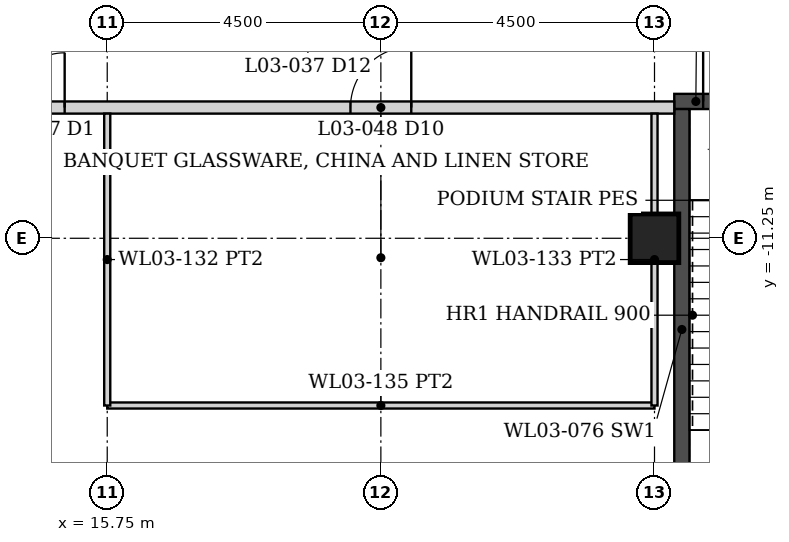
"""IFC4 building model, lengths in metres.
Left out: names, types, materials, properties, quantities, classifications, styles, units other than length and angle.
Written with IfcOpenShell. Run it as: python <this file> out.ifc"""

import sys

from ifc_helpers import new_model, si_unit, direction, frame, frame_2d, origin, origin_2d, place, context, subcontext, project, spatial, rectangle, hollow_rectangle, extrude, element, fill, save


model = new_model("IFC4")
c1 = context("Model", 3, precision=1e-05, world=origin(), true_north=direction((0.0, 1.0)))
c2 = subcontext(c1, "Body", "Model", "MODEL_VIEW")
j1 = project(units=[si_unit("LENGTHUNIT", "METRE"), si_unit("PLANEANGLEUNIT", "RADIAN")], contexts=[c1])
p1 = place(None, origin())
s1 = spatial("IfcSite", under=j1, at=p1, CompositionType="ELEMENT")
p2 = place(p1, origin())
s2 = spatial("IfcBuilding", under=s1, at=p2, CompositionType="ELEMENT")
p3 = place(p2, frame((0.0, 0.0, 16.0)))
s3 = spatial("IfcBuildingStorey", under=s2, at=p3, CompositionType="ELEMENT", Elevation=16.0)
p4 = place(p3, frame((24.75, -11.25, 0.0), z_axis=(0.0, 0.0, 1.0), x_axis=(1.0, 0.0, 0.0)))
e1 = element("IfcColumn", 1, at=p4, inside=s3, PredefinedType="COLUMN", context=c2, shape_type="SweptSolid", body=[
    extrude(hollow_rectangle(XDim=0.8, YDim=0.8, WallThickness=0.08, at=origin_2d()), origin(), (0.0, 0.0, 1.0), 5.5),
])
p5 = place(p3, frame((25.075, -9.0, 0.0), z_axis=(0.0, 0.0, 1.0), x_axis=(1.0, 0.0, 0.0)))
e2 = element("IfcWall", 2, at=p5, inside=s3, PredefinedType="SHEAR", context=c2, shape_type="SweptSolid", body=[
    extrude(rectangle(XDim=3.55, YDim=0.25, at=frame_2d((1.775, 0.0))), origin(), (0.0, 0.0, 1.0), 5.5),
])
p6 = place(p5, frame((0.475, 0.0, 0.0)))
e3 = element("IfcOpeningElement", 3, at=p6, cuts=e2, PredefinedType="OPENING", context=c2, shape_type="SweptSolid", body=[
    extrude(rectangle(XDim=1.2, YDim=2.1, at=frame_2d((0.6, 1.05))), frame((0.0, 0.135, 0.0), z_axis=(0.0, -1.0, 0.0), x_axis=(1.0, 0.0, 0.0)), (0.0, 0.0, 1.0), 0.27),
])
p7 = place(p3, frame((25.2, -16.375, 0.0), z_axis=(0.0, 0.0, 1.0), x_axis=(0.0, 1.0, 0.0)))
e4 = element("IfcWall", 4, at=p7, inside=s3, PredefinedType="SHEAR", context=c2, shape_type="SweptSolid", body=[
    extrude(rectangle(XDim=7.25, YDim=0.25, at=frame_2d((3.625, 0.0))), origin(), (0.0, 0.0, 1.0), 5.5),
])
p8 = place(p3, frame((-25.075, -9.1, 0.0), z_axis=(0.0, 0.0, 1.0), x_axis=(1.0, 0.0, 0.0)))
e5 = element("IfcWall", 5, at=p8, inside=s3, PredefinedType="PARTITIONING", context=c2, shape_type="SweptSolid", body=[
    extrude(rectangle(XDim=50.15, YDim=0.2, at=frame_2d((25.075, 0.0))), origin(), (0.0, 0.0, 1.0), 4.329),
])
p9 = place(p8, frame((2.125, 0.0, 0.0)))
e6 = element("IfcOpeningElement", 6, at=p9, cuts=e5, PredefinedType="OPENING", context=c2, shape_type="SweptSolid", body=[
    extrude(rectangle(XDim=0.9, YDim=2.1, at=frame_2d((0.45, 1.05))), frame((0.0, 0.11, 0.0), z_axis=(0.0, -1.0, 0.0), x_axis=(1.0, 0.0, 0.0)), (0.0, 0.0, 1.0), 0.22),
])
p10 = place(p8, frame((10.225, 0.0, 0.0)))
e7 = element("IfcOpeningElement", 7, at=p10, cuts=e5, PredefinedType="OPENING", context=c2, shape_type="SweptSolid", body=[
    extrude(rectangle(XDim=0.9, YDim=2.1, at=frame_2d((0.45, 1.05))), frame((0.0, 0.11, 0.0), z_axis=(0.0, -1.0, 0.0), x_axis=(1.0, 0.0, 0.0)), (0.0, 0.0, 1.0), 0.22),
])
p11 = place(p8, frame((16.7, 0.0, 0.0)))
e8 = element("IfcOpeningElement", 8, at=p11, cuts=e5, PredefinedType="OPENING", context=c2, shape_type="SweptSolid", body=[
    extrude(rectangle(XDim=1.0, YDim=2.1, at=frame_2d((0.5, 1.05))), frame((0.0, 0.11, 0.0), z_axis=(0.0, -1.0, 0.0), x_axis=(1.0, 0.0, 0.0)), (0.0, 0.0, 1.0), 0.22),
])
p12 = place(p8, frame((14.525, 0.0, 0.0)))
e9 = element("IfcOpeningElement", 9, at=p12, cuts=e5, PredefinedType="OPENING", context=c2, shape_type="SweptSolid", body=[
    extrude(rectangle(XDim=0.9, YDim=2.1, at=frame_2d((0.45, 1.05))), frame((0.0, 0.11, 0.0), z_axis=(0.0, -1.0, 0.0), x_axis=(1.0, 0.0, 0.0)), (0.0, 0.0, 1.0), 0.22),
])
p13 = place(p8, frame((21.25, 0.0, 0.0)))
e10 = element("IfcOpeningElement", 10, at=p13, cuts=e5, PredefinedType="OPENING", context=c2, shape_type="SweptSolid", body=[
    extrude(rectangle(XDim=0.9, YDim=2.1, at=frame_2d((0.45, 1.05))), frame((0.0, 0.11, 0.0), z_axis=(0.0, -1.0, 0.0), x_axis=(1.0, 0.0, 0.0)), (0.0, 0.0, 1.0), 0.22),
])
p14 = place(p8, frame((33.325, 0.0, 0.0)))
e11 = element("IfcOpeningElement", 11, at=p14, cuts=e5, PredefinedType="OPENING", context=c2, shape_type="SweptSolid", body=[
    extrude(rectangle(XDim=1.5, YDim=2.1, at=frame_2d((0.75, 1.05))), frame((0.0, 0.11, 0.0), z_axis=(0.0, -1.0, 0.0), x_axis=(1.0, 0.0, 0.0)), (0.0, 0.0, 1.0), 0.22),
])
p15 = place(p8, frame((36.95, 0.0, 0.0)))
e12 = element("IfcOpeningElement", 12, at=p15, cuts=e5, PredefinedType="OPENING", context=c2, shape_type="SweptSolid", body=[
    extrude(rectangle(XDim=1.0, YDim=2.1, at=frame_2d((0.5, 1.05))), frame((0.0, 0.11, 0.0), z_axis=(0.0, -1.0, 0.0), x_axis=(1.0, 0.0, 0.0)), (0.0, 0.0, 1.0), 0.22),
])
p16 = place(p8, frame((44.825, 0.0, 0.0)))
e13 = element("IfcOpeningElement", 13, at=p16, cuts=e5, PredefinedType="OPENING", context=c2, shape_type="SweptSolid", body=[
    extrude(rectangle(XDim=1.0, YDim=2.1, at=frame_2d((0.5, 1.05))), frame((0.0, 0.11, 0.0), z_axis=(0.0, -1.0, 0.0), x_axis=(1.0, 0.0, 0.0)), (0.0, 0.0, 1.0), 0.22),
])
p17 = place(p8, frame((39.225, 0.0, 0.0)))
e14 = element("IfcOpeningElement", 14, at=p17, cuts=e5, PredefinedType="OPENING", context=c2, shape_type="SweptSolid", body=[
    extrude(rectangle(XDim=0.9, YDim=2.1, at=frame_2d((0.45, 1.05))), frame((0.0, 0.11, 0.0), z_axis=(0.0, -1.0, 0.0), x_axis=(1.0, 0.0, 0.0)), (0.0, 0.0, 1.0), 0.22),
])
p18 = place(p3, frame((15.75, -14.0, 0.0), z_axis=(0.0, 0.0, 1.0), x_axis=(1.0, 0.0, 0.0)))
e15 = element("IfcWall", 15, at=p18, inside=s3, PredefinedType="PARTITIONING", context=c2, shape_type="SweptSolid", body=[
    extrude(rectangle(XDim=9.0, YDim=0.1, at=frame_2d((4.5, 0.0))), origin(), (0.0, 0.0, 1.0), 4.329),
])
for number, where, z_axis, x_axis in (
    (16, (15.75, -14.0, 0.0), (0.0, 0.0, 1.0), (0.0, 1.0, 0.0)),
    (17, (24.75, -14.0, 0.0), (0.0, 0.0, 1.0), (0.0, 1.0, 0.0)),
):
    element("IfcWall", number, at=place(p3, frame(where, z_axis=z_axis, x_axis=x_axis)), inside=s3, PredefinedType="PARTITIONING", context=c2, shape_type="SweptSolid", body=[
        extrude(rectangle(XDim=4.8, YDim=0.1, at=frame_2d((2.4, 0.0))), origin(), (0.0, 0.0, 1.0), 4.329),
    ])
p19 = place(p16, origin())
e18 = element("IfcDoor", 18, at=p19, inside=s3, OperationType="SINGLE_SWING_RIGHT", PredefinedType="DOOR", context=c2, shape_type="SweptSolid", body=[
    extrude(rectangle(XDim=1.0, YDim=2.1, at=frame_2d((0.5, 1.05))), frame((0.0, 0.025, 0.0), z_axis=(0.0, -1.0, 0.0), x_axis=(1.0, 0.0, 0.0)), (0.0, 0.0, 1.0), 0.05),
])
fill(e13, e18)
p20 = place(p17, origin())
e19 = element("IfcDoor", 19, at=p20, inside=s3, OperationType="SINGLE_SWING_RIGHT", PredefinedType="DOOR", context=c2, shape_type="SweptSolid", body=[
    extrude(rectangle(XDim=0.9, YDim=2.1, at=frame_2d((0.45, 1.05))), frame((0.0, 0.025, 0.0), z_axis=(0.0, -1.0, 0.0), x_axis=(1.0, 0.0, 0.0)), (0.0, 0.0, 1.0), 0.05),
])
fill(e14, e19)
p21 = place(p6, origin())
e20 = element("IfcDoor", 20, at=p21, inside=s3, OperationType="SINGLE_SWING_LEFT", PredefinedType="DOOR", context=c2, shape_type="SweptSolid", body=[
    extrude(rectangle(XDim=1.2, YDim=2.1, at=frame_2d((0.6, 1.05))), frame((0.0, 0.025, 0.0), z_axis=(0.0, -1.0, 0.0), x_axis=(1.0, 0.0, 0.0)), (0.0, 0.0, 1.0), 0.05),
])
fill(e3, e20)
save(model, sys.argv[1])
